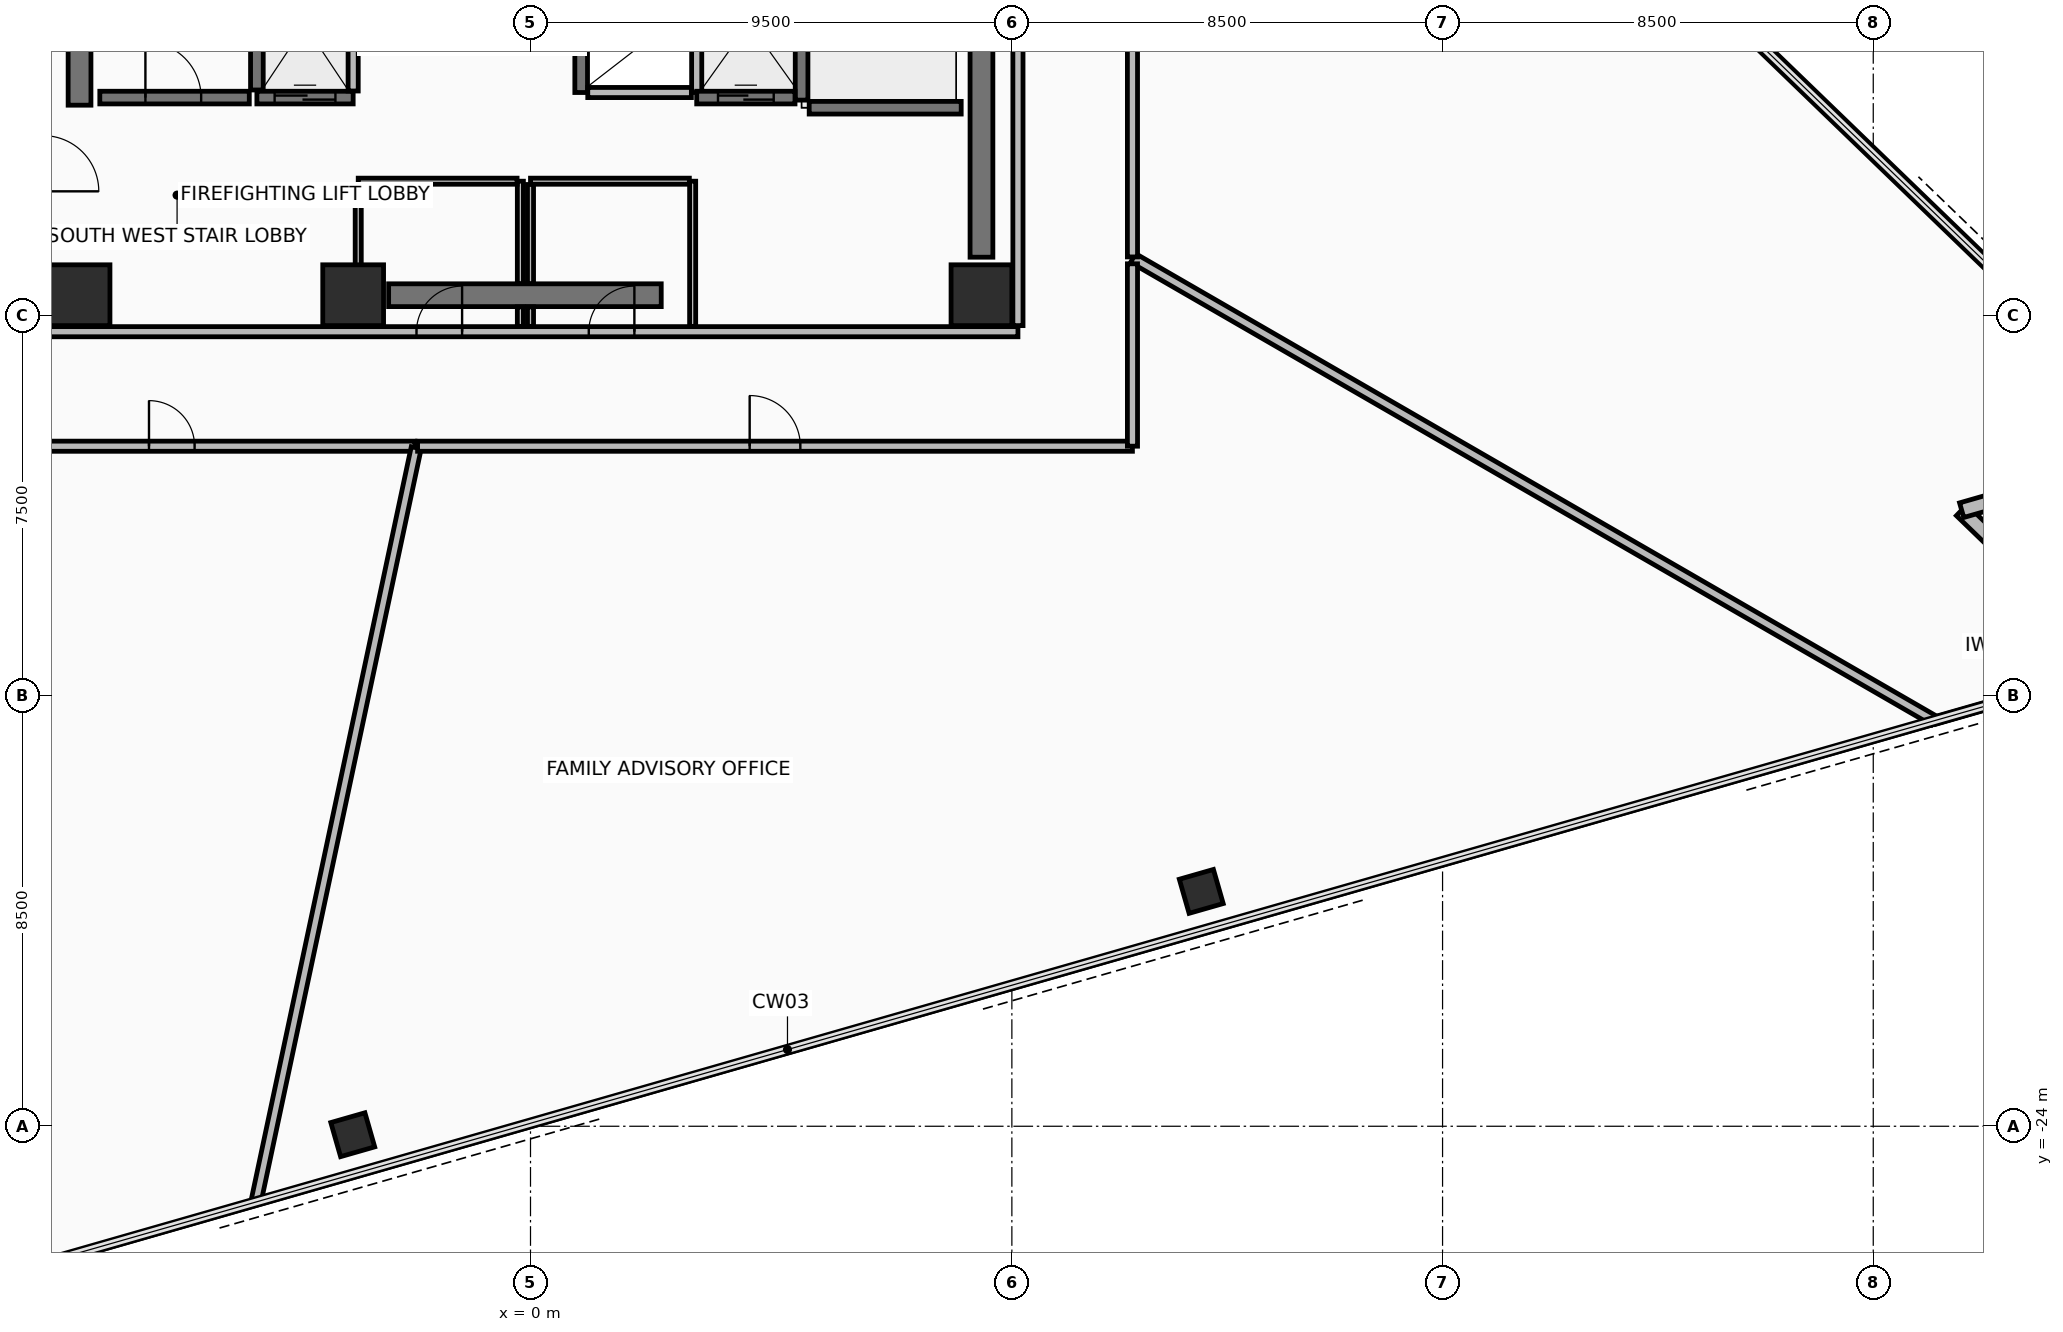
"""IFC4 building model, lengths in metres.
Left out: names, types, materials, properties, quantities, classifications, styles, units other than length and angle.
Written with IfcOpenShell. Run it as: python <this file> out.ifc"""

import sys

from ifc_helpers import new_model, si_unit, direction, frame, frame_2d, origin, origin_2d, place, context, subcontext, project, spatial, rectangle, hollow_rectangle, extrude, element, fill, save


model = new_model("IFC4")
c1 = context("Model", 3, precision=1e-05, world=origin(), true_north=direction((0.0, 1.0)))
c2 = subcontext(c1, "Body", "Model", "MODEL_VIEW")
j1 = project(units=[si_unit("LENGTHUNIT", "METRE"), si_unit("PLANEANGLEUNIT", "RADIAN")], contexts=[c1])
p1 = place(None, origin())
s1 = spatial("IfcSite", under=j1, at=p1, CompositionType="ELEMENT")
p2 = place(p1, origin())
s2 = spatial("IfcBuilding", under=s1, at=p2, CompositionType="ELEMENT")
p3 = place(p2, frame((0.0, 0.0, 104.1)))
s3 = spatial("IfcBuildingStorey", under=s2, at=p3, CompositionType="ELEMENT", Elevation=104.1)
for number, where, z_axis, x_axis in (
    (1, (-8.9, -7.6, 0.0), (0.0, 0.0, 1.0), (1.0, 0.0, 0.0)),
    (2, (-3.5, -7.6, 0.0), (0.0, 0.0, 1.0), (1.0, 0.0, 0.0)),
    (3, (8.9, -7.6, 0.0), (0.0, 0.0, 1.0), (1.0, 0.0, 0.0)),
):
    element("IfcColumn", number, at=place(p3, frame(where, z_axis=z_axis, x_axis=x_axis)), inside=s3, PredefinedType="COLUMN", context=c2, shape_type="SweptSolid", body=[
        extrude(rectangle(XDim=1.2, YDim=1.2, at=origin_2d()), origin(), (0.0, 0.0, 1.0), 3.6),
    ])
for number, where, z_axis, x_axis in (
    (4, (-3.508, -24.167, 0.0), (0.0, 0.0, 1.0), (0.961, 0.276, 0.0)),
    (5, (13.238, -19.365, 0.0), (0.0, 0.0, 1.0), (0.961, 0.276, 0.0)),
):
    element("IfcColumn", number, at=place(p3, frame(where, z_axis=z_axis, x_axis=x_axis)), inside=s3, PredefinedType="COLUMN", context=c2, shape_type="SweptSolid", body=[
        extrude(hollow_rectangle(XDim=0.7, YDim=0.7, WallThickness=0.04, at=origin_2d()), origin(), (0.0, 0.0, 1.0), 3.6),
    ])
p4 = place(p3, frame((31.439, -14.927, 0.0), z_axis=(0.0, 0.0, 1.0), x_axis=(-0.719317126864, 0.694681848763, 0.0)))
e6 = element("IfcWall", 6, at=p4, inside=s3, PredefinedType="STANDARD", context=c2, shape_type="SweptSolid", body=[
    extrude(rectangle(XDim=4.44, YDim=0.3, at=frame_2d((2.22, 0.0))), origin(), (0.0, 0.0, 1.0), 2.605),
])
p5 = place(p3, frame((28.245, -11.842, 0.0), z_axis=(0.0, 0.0, 1.0), x_axis=(0.961255810825, 0.275657878821, 0.0)))
e7 = element("IfcWall", 7, at=p5, inside=s3, PredefinedType="STANDARD", context=c2, shape_type="SweptSolid", body=[
    extrude(rectangle(XDim=4.44, YDim=0.3, at=frame_2d((2.22, 0.0))), origin(), (0.0, 0.0, 1.0), 2.605),
])
p6 = place(p3, frame((-2.8, -7.6, 0.0), z_axis=(0.0, 0.0, 1.0), x_axis=(1.0, 0.0, 0.0)))
e8 = element("IfcWall", 8, at=p6, inside=s3, PredefinedType="SHEAR", context=c2, shape_type="SweptSolid", body=[
    extrude(rectangle(XDim=5.38, YDim=0.45, at=frame_2d((2.69, 0.0))), origin(), (0.0, 0.0, 1.0), 3.41),
])
for number, where, z_axis, x_axis in (
    (9, (-8.9, -3.85, 0.0), (0.0, 0.0, 1.0), (0.0, 1.0, 0.0)),
    (10, (8.9, -6.85, 0.0), (0.0, 0.0, 1.0), (0.0, 1.0, 0.0)),
):
    element("IfcWall", number, at=place(p3, frame(where, z_axis=z_axis, x_axis=x_axis)), inside=s3, PredefinedType="SHEAR", context=c2, shape_type="SweptSolid", body=[
        extrude(rectangle(XDim=10.7, YDim=0.45, at=frame_2d((5.35, 0.0))), origin(), (0.0, 0.0, 1.0), 3.41),
    ])
p7 = place(p3, frame((-9.62, -8.32, 0.0), z_axis=(0.0, 0.0, 1.0), x_axis=(1.0, 0.0, 0.0)))
e11 = element("IfcWall", 11, at=p7, inside=s3, PredefinedType="PARTITIONING", context=c2, shape_type="SweptSolid", body=[
    extrude(rectangle(XDim=19.24, YDim=0.2, at=frame_2d((9.62, 0.0))), origin(), (0.0, 0.0, 1.0), 2.805),
])
p8 = place(p7, frame((7.37, 0.0, 0.0)))
e12 = element("IfcOpeningElement", 12, at=p8, cuts=e11, PredefinedType="OPENING", context=c2, shape_type="SweptSolid", body=[
    extrude(rectangle(XDim=0.9, YDim=2.1, at=frame_2d((0.45, 1.05))), frame((0.0, 0.11, 0.0), z_axis=(0.0, -1.0, 0.0), x_axis=(1.0, 0.0, 0.0)), (0.0, 0.0, 1.0), 0.22),
])
p9 = place(p7, frame((10.77, 0.0, 0.0)))
e13 = element("IfcOpeningElement", 13, at=p9, cuts=e11, PredefinedType="OPENING", context=c2, shape_type="SweptSolid", body=[
    extrude(rectangle(XDim=0.9, YDim=2.1, at=frame_2d((0.45, 1.05))), frame((0.0, 0.11, 0.0), z_axis=(0.0, -1.0, 0.0), x_axis=(1.0, 0.0, 0.0)), (0.0, 0.0, 1.0), 0.22),
])
p10 = place(p3, frame((9.62, -8.2, 0.0), z_axis=(0.0, 0.0, 1.0), x_axis=(0.0, 1.0, 0.0)))
e14 = element("IfcWall", 14, at=p10, inside=s3, PredefinedType="PARTITIONING", context=c2, shape_type="SweptSolid", body=[
    extrude(rectangle(XDim=16.4, YDim=0.2, at=frame_2d((8.2, 0.0))), origin(), (0.0, 0.0, 1.0), 2.805),
])
p11 = place(p10, frame((12.65, 0.0, 0.0)))
e15 = element("IfcOpeningElement", 15, at=p11, cuts=e14, PredefinedType="OPENING", context=c2, shape_type="SweptSolid", body=[
    extrude(rectangle(XDim=1.1, YDim=2.15, at=frame_2d((0.55, 1.075))), frame((0.0, 0.11, 0.0), z_axis=(0.0, -1.0, 0.0), x_axis=(1.0, 0.0, 0.0)), (0.0, 0.0, 1.0), 0.22),
])
p12 = place(p3, frame((-5.4, -3.55, 0.0), z_axis=(0.0, 0.0, 1.0), x_axis=(0.0, 1.0, 0.0)))
e16 = element("IfcWall", 16, at=p12, inside=s3, PredefinedType="SHEAR", context=c2, shape_type="SweptSolid", body=[
    extrude(rectangle(XDim=7.3, YDim=0.25, at=frame_2d((3.65, 0.0))), origin(), (0.0, 0.0, 1.0), 3.41),
])
p13 = place(p3, frame((-8.5, -3.7, 0.0), z_axis=(0.0, 0.0, 1.0), x_axis=(1.0, 0.0, 0.0)))
e17 = element("IfcWall", 17, at=p13, inside=s3, PredefinedType="SHEAR", context=c2, shape_type="SweptSolid", body=[
    extrude(rectangle(XDim=2.95, YDim=0.25, at=frame_2d((1.475, 0.0))), origin(), (0.0, 0.0, 1.0), 3.41),
])
p14 = place(p13, frame((0.9, 0.0, 0.0)))
e18 = element("IfcOpeningElement", 18, at=p14, cuts=e17, PredefinedType="OPENING", context=c2, shape_type="SweptSolid", body=[
    extrude(rectangle(XDim=1.1, YDim=2.15, at=frame_2d((0.55, 1.075))), frame((0.0, 0.135, 0.0), z_axis=(0.0, -1.0, 0.0), x_axis=(1.0, 0.0, 0.0)), (0.0, 0.0, 1.0), 0.27),
])
p15 = place(p3, frame((5.35, -3.75, 0.0), z_axis=(0.0, 0.0, 1.0), x_axis=(0.0, 1.0, 0.0)))
e19 = element("IfcWall", 19, at=p15, inside=s3, PredefinedType="SHEAR", context=c2, shape_type="SweptSolid", body=[
    extrude(rectangle(XDim=7.3, YDim=0.25, at=frame_2d((3.65, 0.0))), origin(), (0.0, 0.0, 1.0), 3.41),
])
p16 = place(p3, frame((5.5, -3.9, 0.0), z_axis=(0.0, 0.0, 1.0), x_axis=(1.0, 0.0, 0.0)))
e20 = element("IfcWall", 20, at=p16, inside=s3, PredefinedType="SHEAR", context=c2, shape_type="SweptSolid", body=[
    extrude(rectangle(XDim=3.0, YDim=0.25, at=frame_2d((1.5, 0.0))), origin(), (0.0, 0.0, 1.0), 3.41),
])
p17 = place(p3, frame((1.0, -3.6, 0.0), z_axis=(0.0, 0.0, 1.0), x_axis=(0.0, 1.0, 0.0)))
e21 = element("IfcWall", 21, at=p17, inside=s3, PredefinedType="SHEAR", context=c2, shape_type="SweptSolid", body=[
    extrude(rectangle(XDim=1.8, YDim=0.25, at=frame_2d((0.9, 0.0))), origin(), (0.0, 0.0, 1.0), 3.41),
])
p18 = place(p3, frame((3.28, -3.6, 0.0), z_axis=(0.0, 0.0, 1.0), x_axis=(0.0, 1.0, 0.0)))
e22 = element("IfcWall", 22, at=p18, inside=s3, PredefinedType="PARTITIONING", context=c2, shape_type="SweptSolid", body=[
    extrude(rectangle(XDim=1.8, YDim=0.2, at=frame_2d((0.9, 0.0))), origin(), (0.0, 0.0, 1.0), 3.41),
])
p19 = place(p3, frame((1.13, -3.6, 0.0), z_axis=(0.0, 0.0, 1.0), x_axis=(1.0, 0.0, 0.0)))
e23 = element("IfcWall", 23, at=p19, inside=s3, PredefinedType="PARTITIONING", context=c2, shape_type="SweptSolid", body=[
    extrude(rectangle(XDim=2.045, YDim=0.2, at=frame_2d((1.022, 0.0))), origin(), (0.0, 0.0, 1.0), 3.41),
])
p20 = place(p3, frame((-5.4, -3.7, 0.0), z_axis=(0.0, 0.0, 1.0), x_axis=(1.0, 0.0, 0.0)))
e24 = element("IfcWall", 24, at=p20, inside=s3, PredefinedType="SHEAR", context=c2, shape_type="SweptSolid", body=[
    extrude(rectangle(XDim=1.9, YDim=0.25, at=frame_2d((0.95, 0.0))), origin(), (0.0, 0.0, 1.0), 3.41),
])
p21 = place(p20, frame((0.35, 0.0, 0.0)))
e25 = element("IfcOpeningElement", 25, at=p21, cuts=e24, PredefinedType="OPENING", context=c2, shape_type="SweptSolid", body=[
    extrude(rectangle(XDim=1.2, YDim=2.2, at=frame_2d((0.6, 1.1))), frame((0.0, 0.135, 0.0), z_axis=(0.0, -1.0, 0.0), x_axis=(1.0, 0.0, 0.0)), (0.0, 0.0, 1.0), 0.27),
])
p22 = place(p3, frame((-3.5, -3.57, 0.0), z_axis=(0.0, 0.0, 1.0), x_axis=(0.0, 1.0, 0.0)))
e26 = element("IfcWall", 26, at=p22, inside=s3, PredefinedType="PARTITIONING", context=c2, shape_type="SweptSolid", body=[
    extrude(rectangle(XDim=2.615, YDim=0.2, at=frame_2d((1.308, 0.0))), origin(), (0.0, 0.0, 1.0), 3.41),
])
p23 = place(p3, frame((3.28, -3.7, 0.0), z_axis=(0.0, 0.0, 1.0), x_axis=(1.0, 0.0, 0.0)))
e27 = element("IfcWall", 27, at=p23, inside=s3, PredefinedType="SHEAR", context=c2, shape_type="SweptSolid", body=[
    extrude(rectangle(XDim=1.94, YDim=0.25, at=frame_2d((0.97, 0.0))), origin(), (0.0, 0.0, 1.0), 3.41),
])
p24 = place(p23, frame((0.42, 0.0, 0.0)))
e28 = element("IfcOpeningElement", 28, at=p24, cuts=e27, PredefinedType="OPENING", context=c2, shape_type="SweptSolid", body=[
    extrude(rectangle(XDim=1.1, YDim=2.2, at=frame_2d((0.55, 1.1))), frame((0.0, 0.135, 0.0), z_axis=(0.0, -1.0, 0.0), x_axis=(1.0, 0.0, 0.0)), (0.0, 0.0, 1.0), 0.27),
])
p25 = place(p3, frame((-0.2, -8.215, 0.0), z_axis=(0.0, 0.0, 1.0), x_axis=(0.0, 1.0, 0.0)))
e29 = element("IfcWall", 29, at=p25, inside=s3, PredefinedType="PARTITIONING", context=c2, shape_type="SweptSolid", body=[
    extrude(rectangle(XDim=0.385, YDim=0.12, at=frame_2d((0.192, 0.0))), origin(), (0.0, 0.0, 1.0), 2.605),
])
p26 = place(p3, frame((-0.2, -7.37, 0.0), z_axis=(0.0, 0.0, 1.0), x_axis=(0.0, 1.0, 0.0)))
e30 = element("IfcWall", 30, at=p26, inside=s3, PredefinedType="PARTITIONING", context=c2, shape_type="SweptSolid", body=[
    extrude(rectangle(XDim=2.02, YDim=0.12, at=frame_2d((1.01, 0.0))), origin(), (0.0, 0.0, 1.0), 2.605),
])
p27 = place(p3, frame((-0.265, -5.35, 0.0), z_axis=(0.0, 0.0, 1.0), x_axis=(-1.0, 0.0, 0.0)))
e31 = element("IfcWall", 31, at=p27, inside=s3, PredefinedType="PARTITIONING", context=c2, shape_type="SweptSolid", body=[
    extrude(rectangle(XDim=3.135, YDim=0.12, at=frame_2d((1.567, 0.0))), origin(), (0.0, 0.0, 1.0), 2.605),
])
p28 = place(p3, frame((-3.4, -5.415, 0.0), z_axis=(0.0, 0.0, 1.0), x_axis=(0.0, -1.0, 0.0)))
e32 = element("IfcWall", 32, at=p28, inside=s3, PredefinedType="PARTITIONING", context=c2, shape_type="SweptSolid", body=[
    extrude(rectangle(XDim=2.8, YDim=0.12, at=frame_2d((1.4, 0.0))), origin(), (0.0, 0.0, 1.0), 2.605),
])
p29 = place(p3, frame((3.2, -8.215, 0.0), z_axis=(0.0, 0.0, 1.0), x_axis=(0.0, 1.0, 0.0)))
e33 = element("IfcWall", 33, at=p29, inside=s3, PredefinedType="PARTITIONING", context=c2, shape_type="SweptSolid", body=[
    extrude(rectangle(XDim=2.865, YDim=0.12, at=frame_2d((1.433, 0.0))), origin(), (0.0, 0.0, 1.0), 2.605),
])
p30 = place(p3, frame((3.135, -5.35, 0.0), z_axis=(0.0, 0.0, 1.0), x_axis=(-1.0, 0.0, 0.0)))
e34 = element("IfcWall", 34, at=p30, inside=s3, PredefinedType="PARTITIONING", context=c2, shape_type="SweptSolid", body=[
    extrude(rectangle(XDim=3.135, YDim=0.12, at=frame_2d((1.567, 0.0))), origin(), (0.0, 0.0, 1.0), 3.41),
])
p31 = place(p3, frame((0.0, -5.415, 0.0), z_axis=(0.0, 0.0, 1.0), x_axis=(0.0, -1.0, 0.0)))
e35 = element("IfcWall", 35, at=p31, inside=s3, PredefinedType="PARTITIONING", context=c2, shape_type="SweptSolid", body=[
    extrude(rectangle(XDim=1.955, YDim=0.12, at=frame_2d((0.978, 0.0))), origin(), (0.0, 0.0, 1.0), 2.605),
])
p32 = place(p3, frame((0.0, -7.83, 0.0), z_axis=(0.0, 0.0, 1.0), x_axis=(0.0, -1.0, 0.0)))
e36 = element("IfcWall", 36, at=p32, inside=s3, PredefinedType="PARTITIONING", context=c2, shape_type="SweptSolid", body=[
    extrude(rectangle(XDim=0.385, YDim=0.12, at=frame_2d((0.192, 0.0))), origin(), (0.0, 0.0, 1.0), 2.605),
])
p33 = place(p3, frame((11.922, 9.266, 0.0), z_axis=(0.0, 0.0, 1.0), x_axis=(0.719341119542, -0.694657004382, 0.0)))
e37 = element("IfcWall", 37, at=p33, inside=s3, PredefinedType="PARTITIONING", context=c2, shape_type="SweptSolid", body=[
    extrude(rectangle(XDim=28.445, YDim=0.2, at=frame_2d((14.223, 0.0))), origin(), (0.0, 0.0, 1.0), 3.41),
])
p34 = place(p3, frame((31.267, -14.976, 0.0), z_axis=(0.0, 0.0, 1.0), x_axis=(-0.96126154114, -0.275637895661, 0.0)))
e38 = element("IfcWall", 38, at=p34, inside=s3, PredefinedType="PARTITIONING", context=c2, shape_type="SweptSolid", body=[
    extrude(rectangle(XDim=3.693, YDim=0.15, at=frame_2d((1.846, 0.0))), origin(), (0.0, 0.0, 1.0), 3.41),
])
p35 = place(p3, frame((27.698, -15.991, 0.0), z_axis=(0.0, 0.0, 1.0), x_axis=(-0.866028310072, 0.499994966129, 0.0)))
e39 = element("IfcWall", 39, at=p35, inside=s3, PredefinedType="PARTITIONING", context=c2, shape_type="SweptSolid", body=[
    extrude(rectangle(XDim=18.25, YDim=0.2, at=frame_2d((9.125, 0.0))), origin(), (0.0, 0.0, 1.0), 2.605),
])
p36 = place(p3, frame((11.88, -6.844, 0.0), z_axis=(0.0, 0.0, 1.0), x_axis=(0.0, 1.0, 0.0)))
e40 = element("IfcWall", 40, at=p36, inside=s3, PredefinedType="PARTITIONING", context=c2, shape_type="SweptSolid", body=[
    extrude(rectangle(XDim=16.005, YDim=0.2, at=frame_2d((8.002, 0.0))), origin(), (0.0, 0.0, 1.0), 2.605),
])
p37 = place(p36, frame((7.578, 0.0, 0.0)))
e41 = element("IfcOpeningElement", 41, at=p37, cuts=e40, PredefinedType="OPENING", context=c2, shape_type="SweptSolid", body=[
    extrude(rectangle(XDim=0.85, YDim=2.1, at=frame_2d((0.425, 1.05))), frame((0.0, 0.11, 0.0), z_axis=(0.0, -1.0, 0.0), x_axis=(1.0, 0.0, 0.0)), (0.0, 0.0, 1.0), 0.22),
])
p38 = place(p3, frame((-11.879, -10.58, 0.0), z_axis=(0.0, 0.0, 1.0), x_axis=(1.0, 0.0, 0.0)))
e42 = element("IfcWall", 42, at=p38, inside=s3, PredefinedType="PARTITIONING", context=c2, shape_type="SweptSolid", body=[
    extrude(rectangle(XDim=9.6, YDim=0.2, at=frame_2d((4.8, 0.0))), origin(), (0.0, 0.0, 1.0), 2.805),
])
p39 = place(p38, frame((4.35, 0.0, 0.0)))
e43 = element("IfcOpeningElement", 43, at=p39, cuts=e42, PredefinedType="OPENING", context=c2, shape_type="SweptSolid", body=[
    extrude(rectangle(XDim=0.9, YDim=2.1, at=frame_2d((0.45, 1.05))), frame((0.0, 0.11, 0.0), z_axis=(0.0, -1.0, 0.0), x_axis=(1.0, 0.0, 0.0)), (0.0, 0.0, 1.0), 0.22),
])
p40 = place(p3, frame((-2.255, -10.61, 0.0), z_axis=(0.0, 0.0, 1.0), x_axis=(-0.207899089065, -0.978150279234, 0.0)))
e44 = element("IfcWall", 44, at=p40, inside=s3, PredefinedType="PARTITIONING", context=c2, shape_type="SweptSolid", body=[
    extrude(rectangle(XDim=15.203, YDim=0.2, at=frame_2d((7.602, 0.0))), origin(), (0.0, 0.0, 1.0), 2.605),
])
p41 = place(p3, frame((-2.229, -10.58, 0.0), z_axis=(0.0, 0.0, 1.0), x_axis=(1.0, 0.0, 0.0)))
e45 = element("IfcWall", 45, at=p41, inside=s3, PredefinedType="PARTITIONING", context=c2, shape_type="SweptSolid", body=[
    extrude(rectangle(XDim=14.108, YDim=0.2, at=frame_2d((7.054, 0.0))), origin(), (0.0, 0.0, 1.0), 2.805),
])
p42 = place(p41, frame((6.554, 0.0, 0.0)))
e46 = element("IfcOpeningElement", 46, at=p42, cuts=e45, PredefinedType="OPENING", context=c2, shape_type="SweptSolid", body=[
    extrude(rectangle(XDim=1.0, YDim=2.15, at=frame_2d((0.5, 1.075))), frame((0.0, 0.11, 0.0), z_axis=(0.0, -1.0, 0.0), x_axis=(1.0, 0.0, 0.0)), (0.0, 0.0, 1.0), 0.22),
])
p43 = place(p3, frame((11.88, -10.579, 0.0), z_axis=(0.0, 0.0, 1.0), x_axis=(0.0, 1.0, 0.0)))
e47 = element("IfcWall", 47, at=p43, inside=s3, PredefinedType="PARTITIONING", context=c2, shape_type="SweptSolid", body=[
    extrude(rectangle(XDim=3.599, YDim=0.2, at=frame_2d((1.8, 0.0))), origin(), (0.0, 0.0, 1.0), 2.805),
])
p44 = place(p14, origin())
e48 = element("IfcDoor", 48, at=p44, inside=s3, OperationType="SINGLE_SWING_LEFT", PredefinedType="DOOR", context=c2, shape_type="SweptSolid", body=[
    extrude(rectangle(XDim=1.1, YDim=2.15, at=frame_2d((0.55, 1.075))), frame((0.0, 0.025, 0.0), z_axis=(0.0, -1.0, 0.0), x_axis=(1.0, 0.0, 0.0)), (0.0, 0.0, 1.0), 0.05),
])
fill(e18, e48)
p45 = place(p21, origin())
e49 = element("IfcDoor", 49, at=p45, inside=s3, OperationType="SLIDING_TO_RIGHT", PredefinedType="DOOR", context=c2, shape_type="SweptSolid", body=[
    extrude(rectangle(XDim=1.2, YDim=2.2, at=frame_2d((0.6, 1.1))), frame((0.0, 0.025, 0.0), z_axis=(0.0, -1.0, 0.0), x_axis=(1.0, 0.0, 0.0)), (0.0, 0.0, 1.0), 0.05),
])
fill(e25, e49)
p46 = place(p24, origin())
e50 = element("IfcDoor", 50, at=p46, inside=s3, OperationType="SLIDING_TO_LEFT", PredefinedType="DOOR", context=c2, shape_type="SweptSolid", body=[
    extrude(rectangle(XDim=1.1, YDim=2.2, at=frame_2d((0.55, 1.1))), frame((0.0, 0.025, 0.0), z_axis=(0.0, -1.0, 0.0), x_axis=(1.0, 0.0, 0.0)), (0.0, 0.0, 1.0), 0.05),
])
fill(e28, e50)
p47 = place(p8, frame((0.9, 0.0, 0.0), z_axis=(0.0, 0.0, 1.0), x_axis=(-1.0, 0.0, 0.0)))
e51 = element("IfcDoor", 51, at=p47, inside=s3, OperationType="SINGLE_SWING_LEFT", PredefinedType="DOOR", context=c2, shape_type="SweptSolid", body=[
    extrude(rectangle(XDim=0.9, YDim=2.1, at=frame_2d((0.45, 1.05))), frame((0.0, 0.025, 0.0), z_axis=(0.0, -1.0, 0.0), x_axis=(1.0, 0.0, 0.0)), (0.0, 0.0, 1.0), 0.05),
])
fill(e12, e51)
p48 = place(p9, frame((0.9, 0.0, 0.0), z_axis=(0.0, 0.0, 1.0), x_axis=(-1.0, 0.0, 0.0)))
e52 = element("IfcDoor", 52, at=p48, inside=s3, OperationType="SINGLE_SWING_LEFT", PredefinedType="DOOR", context=c2, shape_type="SweptSolid", body=[
    extrude(rectangle(XDim=0.9, YDim=2.1, at=frame_2d((0.45, 1.05))), frame((0.0, 0.025, 0.0), z_axis=(0.0, -1.0, 0.0), x_axis=(1.0, 0.0, 0.0)), (0.0, 0.0, 1.0), 0.05),
])
fill(e13, e52)
p49 = place(p39, origin())
e53 = element("IfcDoor", 53, at=p49, inside=s3, OperationType="SINGLE_SWING_LEFT", PredefinedType="DOOR", context=c2, shape_type="SweptSolid", body=[
    extrude(rectangle(XDim=0.9, YDim=2.1, at=frame_2d((0.45, 1.05))), frame((0.0, 0.025, 0.0), z_axis=(0.0, -1.0, 0.0), x_axis=(1.0, 0.0, 0.0)), (0.0, 0.0, 1.0), 0.05),
])
fill(e43, e53)
p50 = place(p42, origin())
e54 = element("IfcDoor", 54, at=p50, inside=s3, OperationType="SINGLE_SWING_RIGHT", PredefinedType="DOOR", context=c2, shape_type="SweptSolid", body=[
    extrude(rectangle(XDim=1.0, YDim=2.15, at=frame_2d((0.5, 1.075))), frame((0.0, 0.025, 0.0), z_axis=(0.0, -1.0, 0.0), x_axis=(1.0, 0.0, 0.0)), (0.0, 0.0, 1.0), 0.05),
])
fill(e46, e54)
save(model, sys.argv[1])
